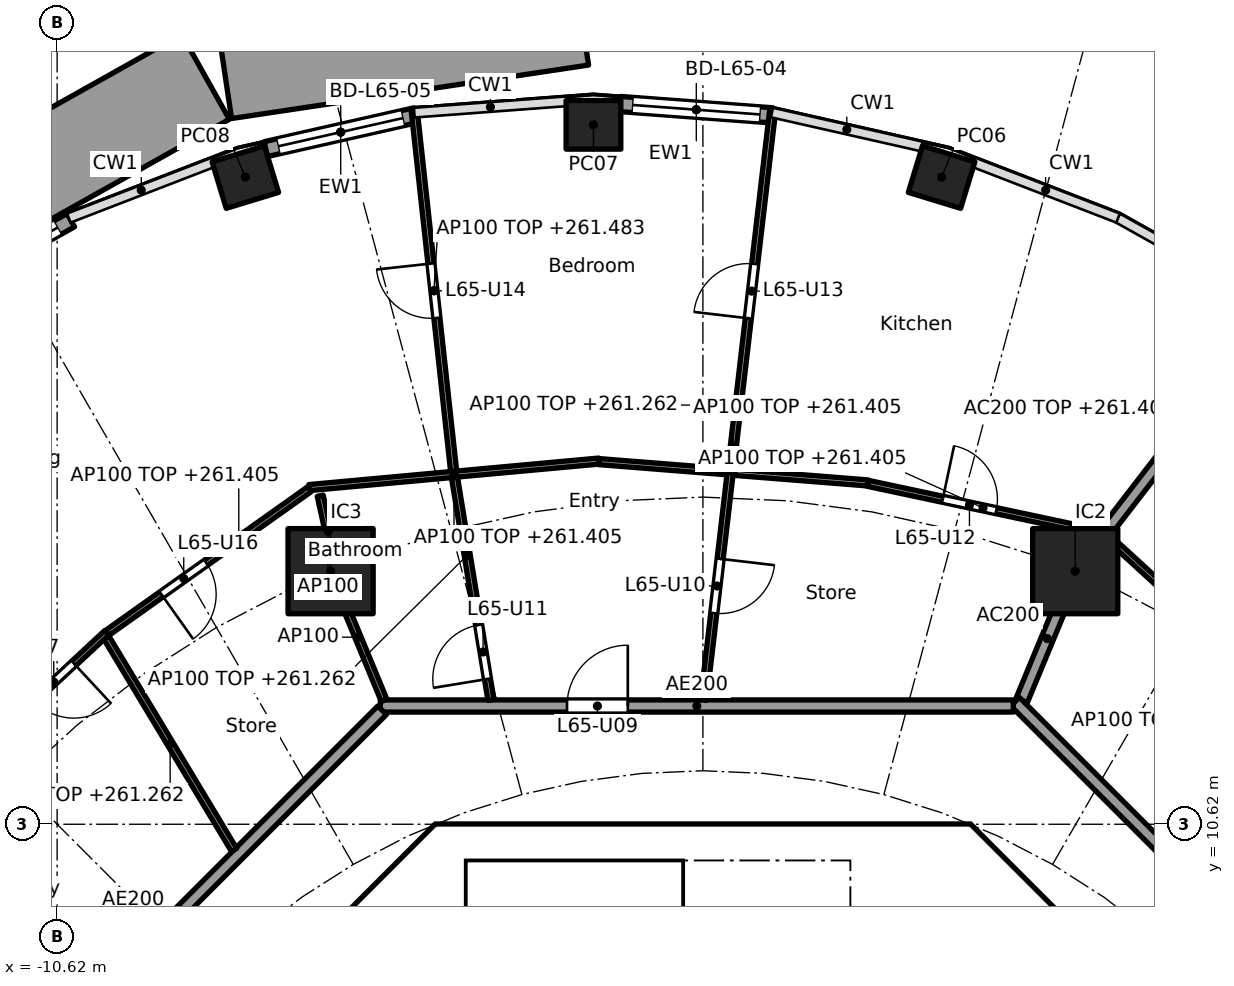
"""IFC4 building model, lengths in metres.
Left out: names, types, materials, properties, quantities, classifications, styles, units other than length and angle.
Written with IfcOpenShell. Run it as: python <this file> out.ifc"""

import sys

from ifc_helpers import new_model, si_unit, direction, frame, frame_2d, origin, origin_2d, place, context, subcontext, project, spatial, polyline, rectangle, hollow_rectangle, outline, extrude, element, fill, save


model = new_model("IFC4")
c1 = context("Model", 3, precision=1e-05, world=origin(), true_north=direction((0.0, 1.0)))
c2 = subcontext(c1, "Body", "Model", "MODEL_VIEW")
j1 = project(units=[si_unit("LENGTHUNIT", "METRE"), si_unit("PLANEANGLEUNIT", "RADIAN")], contexts=[c1])
p1 = place(None, origin())
s1 = spatial("IfcSite", under=j1, at=p1, CompositionType="ELEMENT")
p2 = place(p1, origin())
s2 = spatial("IfcBuilding", under=s1, at=p2, CompositionType="ELEMENT")
p3 = place(p2, frame((0.0, 0.0, 258.5)))
s3 = spatial("IfcBuildingStorey", under=s2, at=p3, CompositionType="ELEMENT", Elevation=258.5)
for number, where, z_axis, x_axis in (
    (1, (3.925, 21.262, -0.26), (0.0, 0.0, 1.0), (-0.957, 0.292, 0.0)),
    (2, (-1.8, 22.122, -0.26), (0.0, 0.0, 1.0), (-1.0, 0.0, 0.0)),
    (3, (-7.525, 21.262, -0.26), (0.0, 0.0, 1.0), (-0.957, -0.292, 0.0)),
):
    element("IfcColumn", number, at=place(p3, frame(where, z_axis=z_axis, x_axis=x_axis)), inside=s3, PredefinedType="COLUMN", context=c2, shape_type="SweptSolid", body=[
        extrude(hollow_rectangle(XDim=0.9, YDim=0.8, WallThickness=0.028, at=origin_2d()), origin(), (0.0, 0.0, 1.0), 3.96),
    ])
for number, where, z_axis, x_axis in (
    (4, (6.123, 14.782, 0.0), (0.0, 0.0, 1.0), (1.0, 0.0, 0.0)),
    (5, (-6.123, 14.782, 0.0), (0.0, 0.0, 1.0), (1.0, 0.0, 0.0)),
):
    element("IfcColumn", number, at=place(p3, frame(where, z_axis=z_axis, x_axis=x_axis)), inside=s3, PredefinedType="COLUMN", context=c2, shape_type="SweptSolid", body=[
        extrude(rectangle(XDim=1.4, YDim=1.4, at=origin_2d()), origin(), (0.0, 0.0, 1.0), 3.7),
    ])
p4 = place(p3, frame((-1.361, 22.464, 0.0), z_axis=(0.0, 0.0, 1.0), x_axis=(0.997229684519, -0.074383844448, 0.0)))
e6 = element("IfcWall", 6, at=p4, inside=s3, PredefinedType="SOLIDWALL", context=c2, shape_type="SweptSolid", body=[
    extrude(rectangle(XDim=2.511, YDim=0.25, at=frame_2d((1.255, 0.0))), origin(), (0.0, 0.0, 1.0), 3.44),
])
p5 = place(p4, frame((0.205, 0.0, 0.0)))
e7 = element("IfcOpeningElement", 7, at=p5, cuts=e6, PredefinedType="OPENING", context=c2, shape_type="SweptSolid", body=[
    extrude(rectangle(XDim=2.1, YDim=2.4, at=frame_2d((1.05, 1.2))), frame((0.0, 0.135, 0.0), z_axis=(0.0, -1.0, 0.0), x_axis=(1.0, 0.0, 0.0)), (0.0, 0.0, 1.0), 0.27),
])
p6 = place(p3, frame((-7.188, 21.723, 0.0), z_axis=(0.0, 0.0, 1.0), x_axis=(0.975319584032, 0.220797891756, 0.0)))
e8 = element("IfcWall", 8, at=p6, inside=s3, PredefinedType="SOLIDWALL", context=c2, shape_type="SweptSolid", body=[
    extrude(rectangle(XDim=2.525, YDim=0.25, at=frame_2d((1.263, 0.0))), origin(), (0.0, 0.0, 1.0), 3.44),
])
p7 = place(p6, frame((0.213, 0.0, 0.0)))
e9 = element("IfcOpeningElement", 9, at=p7, cuts=e8, PredefinedType="OPENING", context=c2, shape_type="SweptSolid", body=[
    extrude(rectangle(XDim=2.1, YDim=2.4, at=frame_2d((1.05, 1.2))), frame((0.0, 0.135, 0.0), z_axis=(0.0, -1.0, 0.0), x_axis=(1.0, 0.0, 0.0)), (0.0, 0.0, 1.0), 0.27),
])
p8 = place(p3, frame((-12.656, 19.285, 0.0), z_axis=(0.0, 0.0, 1.0), x_axis=(0.872075426507, 0.489371485154, 0.0)))
e10 = element("IfcWall", 10, at=p8, inside=s3, PredefinedType="SOLIDWALL", context=c2, shape_type="SweptSolid", body=[
    extrude(rectangle(XDim=2.593, YDim=0.25, at=frame_2d((1.297, 0.0))), origin(), (0.0, 0.0, 1.0), 3.44),
])
p9 = place(p8, frame((0.247, 0.0, 0.0)))
e11 = element("IfcOpeningElement", 11, at=p9, cuts=e10, PredefinedType="OPENING", context=c2, shape_type="SweptSolid", body=[
    extrude(rectangle(XDim=2.1, YDim=2.4, at=frame_2d((1.05, 1.2))), frame((0.0, 0.135, 0.0), z_axis=(0.0, -1.0, 0.0), x_axis=(1.0, 0.0, 0.0)), (0.0, 0.0, 1.0), 0.27),
])
p10 = place(p3, frame((-17.7, 21.733, 0.0), z_axis=(0.0, 0.0, 1.0), x_axis=(0.795897017081, 0.605432026078, 0.0)))
e12 = element("IfcWall", 12, at=p10, inside=s3, PredefinedType="SOLIDWALL", context=c2, shape_type="SweptSolid", body=[
    extrude(rectangle(XDim=8.909, YDim=1.6, at=frame_2d((4.454, 0.0))), origin(), (0.0, 0.0, 1.0), 1.1),
])
p11 = place(p3, frame((-8.179, 22.911, 0.0), z_axis=(0.0, 0.0, 1.0), x_axis=(-0.872191481834, -0.489164613413, 0.0)))
e13 = element("IfcWall", 13, at=p11, inside=s3, PredefinedType="SOLIDWALL", context=c2, shape_type="SweptSolid", body=[
    extrude(rectangle(XDim=9.231, YDim=1.6, at=frame_2d((4.615, 0.0))), origin(), (0.0, 0.0, 1.0), 1.1),
])
p12 = place(p3, frame((-1.999, 23.896, 0.0), z_axis=(0.0, 0.0, 1.0), x_axis=(-0.988966799741, -0.148137331587, 0.0)))
e14 = element("IfcWall", 14, at=p12, inside=s3, PredefinedType="SOLIDWALL", context=c2, shape_type="SweptSolid", body=[
    extrude(rectangle(XDim=5.936, YDim=1.6, at=frame_2d((2.968, 0.0))), origin(), (0.0, 0.0, 1.0), 1.1),
])
p13 = place(p3, frame((6.994, 27.153, 0.0), z_axis=(0.0, 0.0, 1.0), x_axis=(0.835703283826, -0.549181228195, 0.0)))
e15 = element("IfcWall", 15, at=p13, inside=s3, PredefinedType="SOLIDWALL", context=c2, shape_type="SweptSolid", body=[
    extrude(rectangle(XDim=5.832, YDim=1.6, at=frame_2d((2.916, 0.0))), origin(), (0.0, 0.0, 1.0), 1.1),
])
p14 = place(p3, frame((9.988, 4.613, 0.0), z_axis=(0.0, 0.0, 1.0), x_axis=(-0.707106781187, 0.707106781187, 0.0)))
e16 = element("IfcWall", 16, at=p14, inside=s3, PredefinedType="SHEAR", context=c2, shape_type="SweptSolid", body=[
    extrude(rectangle(XDim=7.602, YDim=0.6, at=frame_2d((3.801, 0.0))), origin(), (0.0, 0.0, 1.0), 3.44),
])
p15 = place(p14, frame((3.201, 0.0, 0.0)))
e17 = element("IfcOpeningElement", 17, at=p15, cuts=e16, PredefinedType="OPENING", context=c2, shape_type="SweptSolid", body=[
    extrude(rectangle(XDim=1.2, YDim=2.1, at=frame_2d((0.6, 1.05))), frame((0.0, 0.31, 0.0), z_axis=(0.0, -1.0, 0.0), x_axis=(1.0, 0.0, 0.0)), (0.0, 0.0, 1.0), 0.62),
])
p16 = place(p3, frame((-4.613, 9.988, 0.0), z_axis=(0.0, 0.0, 1.0), x_axis=(-0.707106781187, -0.707106781187, 0.0)))
e18 = element("IfcWall", 18, at=p16, inside=s3, PredefinedType="SHEAR", context=c2, shape_type="SweptSolid", body=[
    extrude(rectangle(XDim=7.602, YDim=0.6, at=frame_2d((3.801, 0.0))), origin(), (0.0, 0.0, 1.0), 3.44),
])
p17 = place(p16, frame((0.351, 0.0, 0.0)))
e19 = element("IfcOpeningElement", 19, at=p17, cuts=e18, PredefinedType="OPENING", context=c2, shape_type="SweptSolid", body=[
    extrude(rectangle(XDim=1.1, YDim=2.1, at=frame_2d((0.55, 1.05))), frame((0.0, 0.31, 0.0), z_axis=(0.0, -1.0, 0.0), x_axis=(1.0, 0.0, 0.0)), (0.0, 0.0, 1.0), 0.62),
])
p18 = place(p3, frame((4.0, 7.025, 0.0), z_axis=(0.0, 0.0, 1.0), x_axis=(0.0, 1.0, 0.0)))
e20 = element("IfcWall", 20, at=p18, inside=s3, PredefinedType="SOLIDWALL", context=c2, shape_type="SweptSolid", body=[
    extrude(rectangle(XDim=3.0, YDim=0.2, at=frame_2d((1.5, 0.0))), origin(), (0.0, 0.0, 1.0), 3.44),
])
p19 = place(p18, frame((0.925, 0.0, 0.0)))
e21 = element("IfcOpeningElement", 21, at=p19, cuts=e20, PredefinedType="OPENING", context=c2, shape_type="SweptSolid", body=[
    extrude(rectangle(XDim=1.1, YDim=2.1, at=frame_2d((0.55, 1.05))), frame((0.0, 0.11, 0.0), z_axis=(0.0, -1.0, 0.0), x_axis=(1.0, 0.0, 0.0)), (0.0, 0.0, 1.0), 0.22),
])
p20 = place(p3, origin())
e22 = element("IfcWall", 22, at=p20, inside=s3, PredefinedType="SHEAR", context=c2, shape_type="SweptSolid", body=[
    extrude(outline(polyline([(-4.152, 10.025), (-4.401, 9.776), (-4.825, 10.2), (-4.401, 10.625), (4.401, 10.625), (4.825, 10.2), (4.401, 9.776), (4.152, 10.025), (-4.152, 10.025)])), origin(), (0.0, 0.0, 1.0), 3.44),
])
p21 = place(p3, origin())
e23 = element("IfcWall", 23, at=p21, inside=s3, PredefinedType="SOLIDWALL", context=c2, shape_type="SweptSolid", body=[
    extrude(outline(polyline([(-3.9, 7.025), (-4.1, 7.025), (-4.1, 10.025), (-3.9, 10.025), (-3.9, 7.025)])), origin(), (0.0, 0.0, 1.0), 3.44),
])
p22 = place(p3, frame((5.243, 12.657, 0.0), z_axis=(0.0, 0.0, 1.0), x_axis=(0.382691608661, 0.923876145736, 0.0)))
e24 = element("IfcWall", 24, at=p22, inside=s3, PredefinedType="PARTITIONING", context=c2, shape_type="SweptSolid", body=[
    extrude(rectangle(XDim=2.2, YDim=0.2, at=frame_2d((1.1, 0.0))), origin(), (0.0, 0.0, 1.0), 3.44),
])
p23 = place(p3, frame((6.154, 14.822, 0.0), z_axis=(0.0, 0.0, 1.0), x_axis=(0.610687612043, 0.791871606068, 0.0)))
e25 = element("IfcWall", 25, at=p23, inside=s3, PredefinedType="PARTITIONING", context=c2, shape_type="SweptSolid", body=[
    extrude(rectangle(XDim=4.455, YDim=0.2, at=frame_2d((2.228, 0.0))), origin(), (0.0, 0.0, 1.0), 2.905),
])
p24 = place(p3, frame((12.635, 5.134, 0.0), z_axis=(0.0, 0.0, 1.0), x_axis=(-0.707106781187, 0.707106781187, 0.0)))
e26 = element("IfcWall", 26, at=p24, inside=s3, PredefinedType="PARTITIONING", context=c2, shape_type="SweptSolid", body=[
    extrude(rectangle(XDim=10.609, YDim=0.2, at=frame_2d((5.305, 0.0))), origin(), (0.0, 0.0, 1.0), 3.44),
])
p25 = place(p3, frame((5.104, 12.565, 0.0), z_axis=(0.0, 0.0, 1.0), x_axis=(-1.0, 0.0, 0.0)))
e27 = element("IfcWall", 27, at=p25, inside=s3, PredefinedType="PARTITIONING", context=c2, shape_type="SweptSolid", body=[
    extrude(rectangle(XDim=10.409, YDim=0.2, at=frame_2d((5.205, 0.0))), origin(), (0.0, 0.0, 1.0), 3.44),
])
p26 = place(p25, frame((6.339, 0.0, 0.0)))
e28 = element("IfcOpeningElement", 28, at=p26, cuts=e27, PredefinedType="OPENING", context=c2, shape_type="SweptSolid", body=[
    extrude(rectangle(XDim=1.0, YDim=2.1, at=frame_2d((0.5, 1.05))), frame((0.0, 0.11, 0.0), z_axis=(0.0, -1.0, 0.0), x_axis=(1.0, 0.0, 0.0)), (0.0, 0.0, 1.0), 0.22),
])
p27 = place(p3, frame((-5.275, 12.494, 0.0), z_axis=(0.0, 0.0, 1.0), x_axis=(-0.707106781187, -0.707106781187, 0.0)))
e29 = element("IfcWall", 29, at=p27, inside=s3, PredefinedType="PARTITIONING", context=c2, shape_type="SweptSolid", body=[
    extrude(rectangle(XDim=10.209, YDim=0.2, at=frame_2d((5.104, 0.0))), origin(), (0.0, 0.0, 1.0), 3.44),
])
p28 = place(p3, frame((10.972, 11.398, 0.0), z_axis=(0.0, 0.0, 1.0), x_axis=(-0.737830272434, 0.674986288069, 0.0)))
e30 = element("IfcWall", 30, at=p28, inside=s3, PredefinedType="PARTITIONING", context=c2, shape_type="SweptSolid", body=[
    extrude(rectangle(XDim=5.827, YDim=0.1, at=frame_2d((2.914, 0.0))), origin(), (0.0, 0.0, 1.0), 2.905),
])
p29 = place(p3, frame((6.5, 15.419, 0.0), z_axis=(0.0, 0.0, 1.0), x_axis=(-0.978053492557, 0.208353943321, 0.0)))
e31 = element("IfcWall", 31, at=p29, inside=s3, PredefinedType="PARTITIONING", context=c2, shape_type="SweptSolid", body=[
    extrude(rectangle(XDim=3.874, YDim=0.1, at=frame_2d((1.937, 0.0))), origin(), (0.0, 0.0, 1.0), 2.905),
])
p30 = place(p29, frame((1.714, 0.0, 0.0)))
e32 = element("IfcOpeningElement", 32, at=p30, cuts=e31, PredefinedType="OPENING", context=c2, shape_type="SweptSolid", body=[
    extrude(rectangle(XDim=0.9, YDim=2.1, at=frame_2d((0.45, 1.05))), frame((0.0, 0.06, 0.0), z_axis=(0.0, -1.0, 0.0), x_axis=(1.0, 0.0, 0.0)), (0.0, 0.0, 1.0), 0.12),
])
p31 = place(p3, frame((2.713, 16.233, 0.0), z_axis=(0.0, 0.0, 1.0), x_axis=(-0.996870142942, 0.079056423588, 0.0)))
e33 = element("IfcWall", 33, at=p31, inside=s3, PredefinedType="PARTITIONING", context=c2, shape_type="SweptSolid", body=[
    extrude(rectangle(XDim=4.438, YDim=0.1, at=frame_2d((2.219, 0.0))), origin(), (0.0, 0.0, 1.0), 2.905),
])
p32 = place(p3, frame((0.012, 12.664, 0.0), z_axis=(0.0, 0.0, 1.0), x_axis=(0.11636251357, 0.993206808996, 0.0)))
e34 = element("IfcWall", 34, at=p32, inside=s3, PredefinedType="PARTITIONING", context=c2, shape_type="SweptSolid", body=[
    extrude(rectangle(XDim=9.765, YDim=0.1, at=frame_2d((4.882, 0.0))), origin(), (0.0, 0.0, 1.0), 2.762),
])
p33 = place(p32, frame((1.437, 0.0, 0.0)))
e35 = element("IfcOpeningElement", 35, at=p33, cuts=e34, PredefinedType="OPENING", context=c2, shape_type="SweptSolid", body=[
    extrude(rectangle(XDim=0.9, YDim=2.1, at=frame_2d((0.45, 1.05))), frame((0.0, 0.06, 0.0), z_axis=(0.0, -1.0, 0.0), x_axis=(1.0, 0.0, 0.0)), (0.0, 0.0, 1.0), 0.12),
])
p34 = place(p32, frame((6.319, 0.0, 0.0)))
e36 = element("IfcOpeningElement", 36, at=p34, cuts=e34, PredefinedType="OPENING", context=c2, shape_type="SweptSolid", body=[
    extrude(rectangle(XDim=0.9, YDim=2.1, at=frame_2d((0.45, 1.05))), frame((0.0, 0.06, 0.0), z_axis=(0.0, -1.0, 0.0), x_axis=(1.0, 0.0, 0.0)), (0.0, 0.0, 1.0), 0.12),
])
p35 = place(p3, frame((-1.711, 16.592, 0.0), z_axis=(0.0, 0.0, 1.0), x_axis=(-0.995843707015, -0.091078599017, 0.0)))
e37 = element("IfcWall", 37, at=p35, inside=s3, PredefinedType="PARTITIONING", context=c2, shape_type="SweptSolid", body=[
    extrude(rectangle(XDim=4.785, YDim=0.1, at=frame_2d((2.392, 0.0))), origin(), (0.0, 0.0, 1.0), 2.905),
])
p36 = place(p3, frame((-3.486, 12.663, 0.0), z_axis=(0.0, 0.0, 1.0), x_axis=(-0.161602751674, 0.986855891532, 0.0)))
e38 = element("IfcWall", 38, at=p36, inside=s3, PredefinedType="PARTITIONING", context=c2, shape_type="SweptSolid", body=[
    extrude(rectangle(XDim=3.71, YDim=0.1, at=frame_2d((1.855, 0.0))), origin(), (0.0, 0.0, 1.0), 2.762),
])
p37 = place(p36, frame((0.35, 0.0, 0.0)))
e39 = element("IfcOpeningElement", 39, at=p37, cuts=e38, PredefinedType="OPENING", context=c2, shape_type="SweptSolid", body=[
    extrude(rectangle(XDim=0.9, YDim=2.1, at=frame_2d((0.45, 1.05))), frame((0.0, 0.06, 0.0), z_axis=(0.0, -1.0, 0.0), x_axis=(1.0, 0.0, 0.0)), (0.0, 0.0, 1.0), 0.12),
])
p38 = place(p3, frame((-4.099, 16.424, 0.0), z_axis=(0.0, 0.0, 1.0), x_axis=(-0.10867295252, 0.99407755703, 0.0)))
e40 = element("IfcWall", 40, at=p38, inside=s3, PredefinedType="PARTITIONING", context=c2, shape_type="SweptSolid", body=[
    extrude(rectangle(XDim=5.974, YDim=0.1, at=frame_2d((2.987, 0.0))), origin(), (0.0, 0.0, 1.0), 2.983),
])
p39 = place(p38, frame((2.537, 0.0, 0.0)))
e41 = element("IfcOpeningElement", 41, at=p39, cuts=e40, PredefinedType="OPENING", context=c2, shape_type="SweptSolid", body=[
    extrude(rectangle(XDim=0.9, YDim=2.1, at=frame_2d((0.45, 1.05))), frame((0.0, 0.06, 0.0), z_axis=(0.0, -1.0, 0.0), x_axis=(1.0, 0.0, 0.0)), (0.0, 0.0, 1.0), 0.12),
])
p40 = place(p3, frame((-5.243, 12.657, 0.0), z_axis=(0.0, 0.0, 1.0), x_axis=(-0.382719158442, 0.923864733477, 0.0)))
e42 = element("IfcWall", 42, at=p40, inside=s3, PredefinedType="PARTITIONING", context=c2, shape_type="SweptSolid", body=[
    extrude(rectangle(XDim=2.25, YDim=0.1, at=frame_2d((1.125, 0.0))), origin(), (0.0, 0.0, 1.0), 3.44),
])
p41 = place(p3, frame((-6.467, 16.132, 0.0), z_axis=(0.0, 0.0, 1.0), x_axis=(-0.815192286069, -0.579190414919, 0.0)))
e43 = element("IfcWall", 43, at=p41, inside=s3, PredefinedType="PARTITIONING", context=c2, shape_type="SweptSolid", body=[
    extrude(rectangle(XDim=4.086, YDim=0.1, at=frame_2d((2.043, 0.0))), origin(), (0.0, 0.0, 1.0), 2.905),
])
p42 = place(p41, frame((2.09, 0.0, 0.0)))
e44 = element("IfcOpeningElement", 44, at=p42, cuts=e43, PredefinedType="OPENING", context=c2, shape_type="SweptSolid", body=[
    extrude(rectangle(XDim=0.9, YDim=2.1, at=frame_2d((0.45, 1.05))), frame((0.0, 0.06, 0.0), z_axis=(0.0, -1.0, 0.0), x_axis=(1.0, 0.0, 0.0)), (0.0, 0.0, 1.0), 0.12),
])
p43 = place(p3, frame((-7.709, 10.197, 0.0), z_axis=(0.0, 0.0, 1.0), x_axis=(-0.515524871668, 0.856874615502, 0.0)))
e45 = element("IfcWall", 45, at=p43, inside=s3, PredefinedType="PARTITIONING", context=c2, shape_type="SweptSolid", body=[
    extrude(rectangle(XDim=4.08, YDim=0.1, at=frame_2d((2.04, 0.0))), origin(), (0.0, 0.0, 1.0), 2.762),
])
p44 = place(p3, frame((-9.802, 13.77, 0.0), z_axis=(0.0, 0.0, 1.0), x_axis=(-0.732662099478, -0.680592571212, 0.0)))
e46 = element("IfcWall", 46, at=p44, inside=s3, PredefinedType="PARTITIONING", context=c2, shape_type="SweptSolid", body=[
    extrude(rectangle(XDim=4.567, YDim=0.1, at=frame_2d((2.283, 0.0))), origin(), (0.0, 0.0, 1.0), 2.905),
])
p45 = place(p44, frame((0.742, 0.0, 0.0)))
e47 = element("IfcOpeningElement", 47, at=p45, cuts=e46, PredefinedType="OPENING", context=c2, shape_type="SweptSolid", body=[
    extrude(rectangle(XDim=0.9, YDim=2.1, at=frame_2d((0.45, 1.05))), frame((0.0, 0.06, 0.0), z_axis=(0.0, -1.0, 0.0), x_axis=(1.0, 0.0, 0.0)), (0.0, 0.0, 1.0), 0.12),
])
p46 = place(p3, frame((-6.036, 14.853, 0.0), z_axis=(0.0, 0.0, 1.0), x_axis=(-0.215009518078, 0.976611953202, 0.0)))
e48 = element("IfcWall", 48, at=p46, inside=s3, PredefinedType="PARTITIONING", context=c2, shape_type="SweptSolid", body=[
    extrude(rectangle(XDim=1.198, YDim=0.1, at=frame_2d((0.599, 0.0))), origin(), (0.0, 0.0, 1.0), 3.44),
])
p47 = place(p5, origin())
e49 = element("IfcDoor", 49, at=p47, inside=s3, OperationType="SLIDING_TO_LEFT", PredefinedType="DOOR", context=c2, shape_type="SweptSolid", body=[
    extrude(rectangle(XDim=2.1, YDim=2.4, at=frame_2d((1.05, 1.2))), frame((0.0, 0.025, 0.0), z_axis=(0.0, -1.0, 0.0), x_axis=(1.0, 0.0, 0.0)), (0.0, 0.0, 1.0), 0.05),
])
fill(e7, e49)
p48 = place(p7, origin())
e50 = element("IfcDoor", 50, at=p48, inside=s3, OperationType="SLIDING_TO_LEFT", PredefinedType="DOOR", context=c2, shape_type="SweptSolid", body=[
    extrude(rectangle(XDim=2.1, YDim=2.4, at=frame_2d((1.05, 1.2))), frame((0.0, 0.025, 0.0), z_axis=(0.0, -1.0, 0.0), x_axis=(1.0, 0.0, 0.0)), (0.0, 0.0, 1.0), 0.05),
])
fill(e9, e50)
p49 = place(p9, origin())
e51 = element("IfcDoor", 51, at=p49, inside=s3, OperationType="SLIDING_TO_LEFT", PredefinedType="DOOR", context=c2, shape_type="SweptSolid", body=[
    extrude(rectangle(XDim=2.1, YDim=2.4, at=frame_2d((1.05, 1.2))), frame((0.0, 0.025, 0.0), z_axis=(0.0, -1.0, 0.0), x_axis=(1.0, 0.0, 0.0)), (0.0, 0.0, 1.0), 0.05),
])
fill(e11, e51)
p50 = place(p17, origin())
e52 = element("IfcDoor", 52, at=p50, inside=s3, OperationType="SINGLE_SWING_LEFT", PredefinedType="DOOR", context=c2, shape_type="SweptSolid", body=[
    extrude(rectangle(XDim=1.1, YDim=2.1, at=frame_2d((0.55, 1.05))), frame((0.0, 0.025, 0.0), z_axis=(0.0, -1.0, 0.0), x_axis=(1.0, 0.0, 0.0)), (0.0, 0.0, 1.0), 0.05),
])
fill(e19, e52)
p51 = place(p26, frame((1.0, 0.0, 0.0), x_axis=(-1.0, 0.0, 0.0)))
e53 = element("IfcDoor", 53, at=p51, inside=s3, OperationType="SINGLE_SWING_RIGHT", PredefinedType="DOOR", context=c2, shape_type="SweptSolid", body=[
    extrude(rectangle(XDim=1.0, YDim=2.1, at=frame_2d((0.5, 1.05))), frame((0.0, 0.025, 0.0), z_axis=(0.0, -1.0, 0.0), x_axis=(1.0, 0.0, 0.0)), (0.0, 0.0, 1.0), 0.05),
])
fill(e28, e53)
p52 = place(p33, frame((0.9, 0.0, 0.0), x_axis=(-1.0, 0.0, 0.0)))
e54 = element("IfcDoor", 54, at=p52, inside=s3, OperationType="SINGLE_SWING_LEFT", PredefinedType="DOOR", context=c2, shape_type="SweptSolid", body=[
    extrude(rectangle(XDim=0.9, YDim=2.1, at=frame_2d((0.45, 1.05))), frame((0.0, 0.025, 0.0), z_axis=(0.0, -1.0, 0.0), x_axis=(1.0, 0.0, 0.0)), (0.0, 0.0, 1.0), 0.05),
])
fill(e35, e54)
p53 = place(p37, origin())
e55 = element("IfcDoor", 55, at=p53, inside=s3, OperationType="SINGLE_SWING_LEFT", PredefinedType="DOOR", context=c2, shape_type="SweptSolid", body=[
    extrude(rectangle(XDim=0.9, YDim=2.1, at=frame_2d((0.45, 1.05))), frame((0.0, 0.025, 0.0), z_axis=(0.0, -1.0, 0.0), x_axis=(1.0, 0.0, 0.0)), (0.0, 0.0, 1.0), 0.05),
])
fill(e39, e55)
p54 = place(p30, frame((0.9, 0.0, 0.0), x_axis=(-1.0, 0.0, 0.0)))
e56 = element("IfcDoor", 56, at=p54, inside=s3, OperationType="SINGLE_SWING_LEFT", PredefinedType="DOOR", context=c2, shape_type="SweptSolid", body=[
    extrude(rectangle(XDim=0.9, YDim=2.1, at=frame_2d((0.45, 1.05))), frame((0.0, 0.025, 0.0), z_axis=(0.0, -1.0, 0.0), x_axis=(1.0, 0.0, 0.0)), (0.0, 0.0, 1.0), 0.05),
])
fill(e32, e56)
p55 = place(p34, origin())
e57 = element("IfcDoor", 57, at=p55, inside=s3, OperationType="SINGLE_SWING_LEFT", PredefinedType="DOOR", context=c2, shape_type="SweptSolid", body=[
    extrude(rectangle(XDim=0.9, YDim=2.1, at=frame_2d((0.45, 1.05))), frame((0.0, 0.025, 0.0), z_axis=(0.0, -1.0, 0.0), x_axis=(1.0, 0.0, 0.0)), (0.0, 0.0, 1.0), 0.05),
])
fill(e36, e57)
p56 = place(p39, origin())
e58 = element("IfcDoor", 58, at=p56, inside=s3, OperationType="SINGLE_SWING_RIGHT", PredefinedType="DOOR", context=c2, shape_type="SweptSolid", body=[
    extrude(rectangle(XDim=0.9, YDim=2.1, at=frame_2d((0.45, 1.05))), frame((0.0, 0.025, 0.0), z_axis=(0.0, -1.0, 0.0), x_axis=(1.0, 0.0, 0.0)), (0.0, 0.0, 1.0), 0.05),
])
fill(e41, e58)
p57 = place(p42, origin())
e59 = element("IfcDoor", 59, at=p57, inside=s3, OperationType="SINGLE_SWING_RIGHT", PredefinedType="DOOR", context=c2, shape_type="SweptSolid", body=[
    extrude(rectangle(XDim=0.9, YDim=2.1, at=frame_2d((0.45, 1.05))), frame((0.0, 0.025, 0.0), z_axis=(0.0, -1.0, 0.0), x_axis=(1.0, 0.0, 0.0)), (0.0, 0.0, 1.0), 0.05),
])
fill(e44, e59)
p58 = place(p45, origin())
e60 = element("IfcDoor", 60, at=p58, inside=s3, OperationType="SINGLE_SWING_LEFT", PredefinedType="DOOR", context=c2, shape_type="SweptSolid", body=[
    extrude(rectangle(XDim=0.9, YDim=2.1, at=frame_2d((0.45, 1.05))), frame((0.0, 0.025, 0.0), z_axis=(0.0, -1.0, 0.0), x_axis=(1.0, 0.0, 0.0)), (0.0, 0.0, 1.0), 0.05),
])
fill(e47, e60)
save(model, sys.argv[1])
